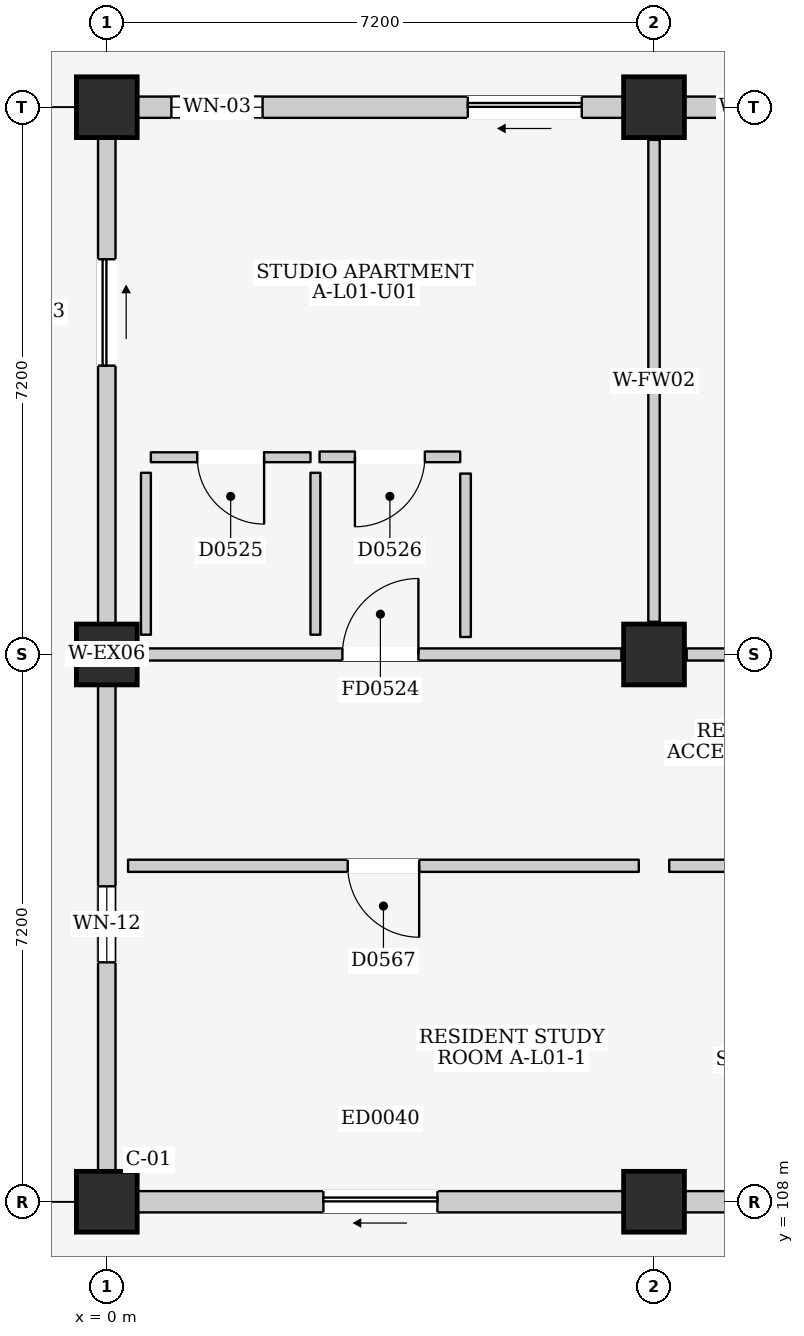
"""IFC4 building model, lengths in metres.
Left out: names, types, materials, properties, quantities, classifications, styles, units other than length and angle.
Written with IfcOpenShell. Run it as: python <this file> out.ifc"""

import sys

from ifc_helpers import new_model, si_unit, direction, frame, frame_2d, origin, origin_2d, place, context, subcontext, project, spatial, rectangle, extrude, element, fill, save


model = new_model("IFC4")
c1 = context("Model", 3, precision=1e-05, world=origin(), true_north=direction((0.0, 1.0)))
c2 = subcontext(c1, "Body", "Model", "MODEL_VIEW")
j1 = project(units=[si_unit("LENGTHUNIT", "METRE"), si_unit("PLANEANGLEUNIT", "RADIAN")], contexts=[c1])
p1 = place(None, origin())
s1 = spatial("IfcSite", under=j1, at=p1, CompositionType="ELEMENT")
p2 = place(p1, origin())
s2 = spatial("IfcBuilding", under=s1, at=p2, CompositionType="ELEMENT")
p3 = place(p2, frame((0.0, 0.0, 4.5)))
s3 = spatial("IfcBuildingStorey", under=s2, at=p3, CompositionType="ELEMENT", Elevation=4.5)
for number, where, z_axis, x_axis in (
    (1, (0.0, 108.0, 0.0), (0.0, 0.0, 1.0), (1.0, 0.0, 0.0)),
    (2, (0.0, 115.2, 0.0), (0.0, 0.0, 1.0), (1.0, 0.0, 0.0)),
    (3, (0.0, 122.4, 0.0), (0.0, 0.0, 1.0), (1.0, 0.0, 0.0)),
    (4, (7.2, 108.0, 0.0), (0.0, 0.0, 1.0), (1.0, 0.0, 0.0)),
    (5, (7.2, 115.2, 0.0), (0.0, 0.0, 1.0), (1.0, 0.0, 0.0)),
    (6, (7.2, 122.4, 0.0), (0.0, 0.0, 1.0), (1.0, 0.0, 0.0)),
):
    element("IfcColumn", number, at=place(p3, frame(where, z_axis=z_axis, x_axis=x_axis)), inside=s3, PredefinedType="COLUMN", context=c2, shape_type="SweptSolid", body=[
        extrude(rectangle(XDim=0.8, YDim=0.8, at=origin_2d()), origin(), (0.0, 0.0, 1.0), 4.5),
    ])
p4 = place(p3, frame((0.4, 122.4, 0.0), z_axis=(0.0, 0.0, 1.0), x_axis=(1.0, 0.0, 0.0)))
e7 = element("IfcWall", 7, at=p4, inside=s3, PredefinedType="ELEMENTEDWALL", context=c2, shape_type="SweptSolid", body=[
    extrude(rectangle(XDim=6.4, YDim=0.28, at=frame_2d((3.2, 0.0))), origin(), (0.0, 0.0, 1.0), 3.715),
])
p5 = place(p4, frame((4.35, 0.0, 0.0)))
e8 = element("IfcOpeningElement", 8, at=p5, cuts=e7, PredefinedType="OPENING", context=c2, shape_type="SweptSolid", body=[
    extrude(rectangle(XDim=1.5, YDim=2.12, at=frame_2d((0.75, 1.06))), frame((0.0, 0.155, 0.0), z_axis=(0.0, -1.0, 0.0), x_axis=(1.0, 0.0, 0.0)), (0.0, 0.0, 1.0), 0.31),
])
p6 = place(p4, frame((0.45, 0.0, 0.9)))
e9 = element("IfcOpeningElement", 9, at=p6, cuts=e7, PredefinedType="OPENING", context=c2, shape_type="SweptSolid", body=[
    extrude(rectangle(XDim=1.2, YDim=1.35, at=frame_2d((0.6, 0.675))), frame((0.0, 0.155, 0.0), z_axis=(0.0, -1.0, 0.0), x_axis=(1.0, 0.0, 0.0)), (0.0, 0.0, 1.0), 0.31),
])
p7 = place(p3, frame((0.4, 108.0, 0.0), z_axis=(0.0, 0.0, 1.0), x_axis=(1.0, 0.0, 0.0)))
e10 = element("IfcWall", 10, at=p7, inside=s3, PredefinedType="ELEMENTEDWALL", context=c2, shape_type="SweptSolid", body=[
    extrude(rectangle(XDim=6.4, YDim=0.28, at=frame_2d((3.2, 0.0))), origin(), (0.0, 0.0, 1.0), 3.585),
])
p8 = place(p7, frame((2.45, 0.0, 0.0)))
e11 = element("IfcOpeningElement", 11, at=p8, cuts=e10, PredefinedType="OPENING", context=c2, shape_type="SweptSolid", body=[
    extrude(rectangle(XDim=1.5, YDim=2.12, at=frame_2d((0.75, 1.06))), frame((0.0, 0.155, 0.0), z_axis=(0.0, -1.0, 0.0), x_axis=(1.0, 0.0, 0.0)), (0.0, 0.0, 1.0), 0.31),
])
p9 = place(p3, frame((7.6, 122.4, 0.0), z_axis=(0.0, 0.0, 1.0), x_axis=(1.0, 0.0, 0.0)))
e12 = element("IfcWall", 12, at=p9, inside=s3, PredefinedType="ELEMENTEDWALL", context=c2, shape_type="SweptSolid", body=[
    extrude(rectangle(XDim=6.4, YDim=0.28, at=frame_2d((3.2, 0.0))), origin(), (0.0, 0.0, 1.0), 3.715),
])
p10 = place(p9, frame((3.45, 0.0, 0.0)))
e13 = element("IfcOpeningElement", 13, at=p10, cuts=e12, PredefinedType="OPENING", context=c2, shape_type="SweptSolid", body=[
    extrude(rectangle(XDim=2.4, YDim=2.12, at=frame_2d((1.2, 1.06))), frame((0.0, 0.155, 0.0), z_axis=(0.0, -1.0, 0.0), x_axis=(1.0, 0.0, 0.0)), (0.0, 0.0, 1.0), 0.31),
])
p11 = place(p9, frame((0.45, 0.0, 0.9)))
e14 = element("IfcOpeningElement", 14, at=p11, cuts=e12, PredefinedType="OPENING", context=c2, shape_type="SweptSolid", body=[
    extrude(rectangle(XDim=0.9, YDim=1.1, at=frame_2d((0.45, 0.55))), frame((0.0, 0.155, 0.0), z_axis=(0.0, -1.0, 0.0), x_axis=(1.0, 0.0, 0.0)), (0.0, 0.0, 1.0), 0.31),
])
p12 = place(p3, frame((7.6, 108.0, 0.0), z_axis=(0.0, 0.0, 1.0), x_axis=(1.0, 0.0, 0.0)))
e15 = element("IfcWall", 15, at=p12, inside=s3, PredefinedType="ELEMENTEDWALL", context=c2, shape_type="SweptSolid", body=[
    extrude(rectangle(XDim=6.4, YDim=0.28, at=frame_2d((3.2, 0.0))), origin(), (0.0, 0.0, 1.0), 3.585),
])
p13 = place(p12, frame((2.45, 0.0, 0.0)))
e16 = element("IfcOpeningElement", 16, at=p13, cuts=e15, PredefinedType="OPENING", context=c2, shape_type="SweptSolid", body=[
    extrude(rectangle(XDim=1.5, YDim=2.12, at=frame_2d((0.75, 1.06))), frame((0.0, 0.155, 0.0), z_axis=(0.0, -1.0, 0.0), x_axis=(1.0, 0.0, 0.0)), (0.0, 0.0, 1.0), 0.31),
])
p14 = place(p3, frame((0.0, 108.4, 0.0), z_axis=(0.0, 0.0, 1.0), x_axis=(0.0, 1.0, 0.0)))
e17 = element("IfcWall", 17, at=p14, inside=s3, PredefinedType="ELEMENTEDWALL", context=c2, shape_type="SweptSolid", body=[
    extrude(rectangle(XDim=6.4, YDim=0.23, at=frame_2d((3.2, 0.0))), origin(), (0.0, 0.0, 1.0), 3.715),
])
p15 = place(p14, frame((2.75, 0.0, 1.1)))
e18 = element("IfcOpeningElement", 18, at=p15, cuts=e17, PredefinedType="OPENING", context=c2, shape_type="SweptSolid", body=[
    extrude(rectangle(XDim=1.0, YDim=0.9, at=frame_2d((0.5, 0.45))), frame((0.0, 0.13, 0.0), z_axis=(0.0, -1.0, 0.0), x_axis=(1.0, 0.0, 0.0)), (0.0, 0.0, 1.0), 0.26),
])
p16 = place(p3, frame((0.0, 115.6, 0.0), z_axis=(0.0, 0.0, 1.0), x_axis=(0.0, 1.0, 0.0)))
e19 = element("IfcWall", 19, at=p16, inside=s3, PredefinedType="ELEMENTEDWALL", context=c2, shape_type="SweptSolid", body=[
    extrude(rectangle(XDim=6.4, YDim=0.23, at=frame_2d((3.2, 0.0))), origin(), (0.0, 0.0, 1.0), 3.715),
])
p17 = place(p16, frame((3.4, 0.0, 0.0)))
e20 = element("IfcOpeningElement", 20, at=p17, cuts=e19, PredefinedType="OPENING", context=c2, shape_type="SweptSolid", body=[
    extrude(rectangle(XDim=1.4, YDim=2.1, at=frame_2d((0.7, 1.05))), frame((0.0, 0.13, 0.0), z_axis=(0.0, -1.0, 0.0), x_axis=(1.0, 0.0, 0.0)), (0.0, 0.0, 1.0), 0.26),
])
p18 = place(p3, frame((0.43, 115.2, 0.0), z_axis=(0.0, 0.0, 1.0), x_axis=(1.0, 0.0, 0.0)))
e21 = element("IfcWall", 21, at=p18, inside=s3, PredefinedType="PARTITIONING", context=c2, shape_type="SweptSolid", body=[
    extrude(rectangle(XDim=6.34, YDim=0.16, at=frame_2d((3.17, 0.0))), origin(), (0.0, 0.0, 1.0), 3.585),
])
p19 = place(p18, frame((2.67, 0.0, 0.0)))
e22 = element("IfcOpeningElement", 22, at=p19, cuts=e21, PredefinedType="OPENING", context=c2, shape_type="SweptSolid", body=[
    extrude(rectangle(XDim=1.0, YDim=2.15, at=frame_2d((0.5, 1.075))), frame((0.0, 0.095, 0.0), z_axis=(0.0, -1.0, 0.0), x_axis=(1.0, 0.0, 0.0)), (0.0, 0.0, 1.0), 0.19),
])
p20 = place(p3, frame((7.2, 115.63, 0.0), z_axis=(0.0, 0.0, 1.0), x_axis=(0.0, 1.0, 0.0)))
e23 = element("IfcWall", 23, at=p20, inside=s3, PredefinedType="PARTITIONING", context=c2, shape_type="SweptSolid", body=[
    extrude(rectangle(XDim=6.34, YDim=0.15, at=frame_2d((3.17, 0.0))), origin(), (0.0, 0.0, 1.0), 3.685),
])
p21 = place(p3, frame((0.58, 117.795, 0.0), z_axis=(0.0, 0.0, 1.0), x_axis=(1.0, 0.0, 0.0)))
e24 = element("IfcWall", 24, at=p21, inside=s3, PredefinedType="PARTITIONING", context=c2, shape_type="SweptSolid", body=[
    extrude(rectangle(XDim=2.1, YDim=0.13, at=frame_2d((1.05, 0.0))), origin(), (0.0, 0.0, 1.0), 4.25),
])
p22 = place(p21, frame((0.61, 0.0, 0.0)))
e25 = element("IfcOpeningElement", 25, at=p22, cuts=e24, PredefinedType="OPENING", context=c2, shape_type="SweptSolid", body=[
    extrude(rectangle(XDim=0.88, YDim=2.1, at=frame_2d((0.44, 1.05))), frame((0.0, 0.08, 0.0), z_axis=(0.0, -1.0, 0.0), x_axis=(1.0, 0.0, 0.0)), (0.0, 0.0, 1.0), 0.16),
])
for number, where, z_axis, x_axis in (
    (26, (2.745, 115.46, 0.0), (0.0, 0.0, 1.0), (0.0, 1.0, 0.0)),
    (27, (0.515, 115.46, 0.0), (0.0, 0.0, 1.0), (0.0, 1.0, 0.0)),
):
    element("IfcWall", number, at=place(p3, frame(where, z_axis=z_axis, x_axis=x_axis)), inside=s3, PredefinedType="PARTITIONING", context=c2, shape_type="SweptSolid", body=[
        extrude(rectangle(XDim=2.13, YDim=0.13, at=frame_2d((1.065, 0.0))), origin(), (0.0, 0.0, 1.0), 4.25),
    ])
p23 = place(p3, frame((2.8, 117.8, 0.0), z_axis=(0.0, 0.0, 1.0), x_axis=(1.0, 0.0, 0.0)))
e28 = element("IfcWall", 28, at=p23, inside=s3, PredefinedType="PARTITIONING", context=c2, shape_type="SweptSolid", body=[
    extrude(rectangle(XDim=1.85, YDim=0.14, at=frame_2d((0.925, 0.0))), origin(), (0.0, 0.0, 1.0), 4.25),
])
p24 = place(p23, frame((0.465, 0.0, 0.0)))
e29 = element("IfcOpeningElement", 29, at=p24, cuts=e28, PredefinedType="OPENING", context=c2, shape_type="SweptSolid", body=[
    extrude(rectangle(XDim=0.92, YDim=2.1, at=frame_2d((0.46, 1.05))), frame((0.0, 0.085, 0.0), z_axis=(0.0, -1.0, 0.0), x_axis=(1.0, 0.0, 0.0)), (0.0, 0.0, 1.0), 0.17),
])
p25 = place(p3, frame((4.72, 115.43, 0.0), z_axis=(0.0, 0.0, 1.0), x_axis=(0.0, 1.0, 0.0)))
e30 = element("IfcWall", 30, at=p25, inside=s3, PredefinedType="PARTITIONING", context=c2, shape_type="SweptSolid", body=[
    extrude(rectangle(XDim=2.15, YDim=0.14, at=frame_2d((1.075, 0.0))), origin(), (0.0, 0.0, 1.0), 4.25),
])
p26 = place(p3, frame((7.63, 115.2, 0.0), z_axis=(0.0, 0.0, 1.0), x_axis=(1.0, 0.0, 0.0)))
e31 = element("IfcWall", 31, at=p26, inside=s3, PredefinedType="PARTITIONING", context=c2, shape_type="SweptSolid", body=[
    extrude(rectangle(XDim=6.34, YDim=0.16, at=frame_2d((3.17, 0.0))), origin(), (0.0, 0.0, 1.0), 3.585),
])
p27 = place(p26, frame((2.645, 0.0, 0.0)))
e32 = element("IfcOpeningElement", 32, at=p27, cuts=e31, PredefinedType="OPENING", context=c2, shape_type="SweptSolid", body=[
    extrude(rectangle(XDim=1.05, YDim=2.2, at=frame_2d((0.525, 1.1))), frame((0.0, 0.095, 0.0), z_axis=(0.0, -1.0, 0.0), x_axis=(1.0, 0.0, 0.0)), (0.0, 0.0, 1.0), 0.19),
])
p28 = place(p3, frame((0.28, 112.42, 0.0), z_axis=(0.0, 0.0, 1.0), x_axis=(1.0, 0.0, 0.0)))
e33 = element("IfcWall", 33, at=p28, inside=s3, PredefinedType="PARTITIONING", context=c2, shape_type="SweptSolid", body=[
    extrude(rectangle(XDim=6.72, YDim=0.16, at=frame_2d((3.36, 0.0))), origin(), (0.0, 0.0, 1.0), 4.25),
])
p29 = place(p28, frame((2.89, 0.0, 0.0)))
e34 = element("IfcOpeningElement", 34, at=p29, cuts=e33, PredefinedType="OPENING", context=c2, shape_type="SweptSolid", body=[
    extrude(rectangle(XDim=0.94, YDim=2.12, at=frame_2d((0.47, 1.06))), frame((0.0, 0.095, 0.0), z_axis=(0.0, -1.0, 0.0), x_axis=(1.0, 0.0, 0.0)), (0.0, 0.0, 1.0), 0.19),
])
p30 = place(p3, frame((7.4, 112.42, 0.0), z_axis=(0.0, 0.0, 1.0), x_axis=(1.0, 0.0, 0.0)))
e35 = element("IfcWall", 35, at=p30, inside=s3, PredefinedType="PARTITIONING", context=c2, shape_type="SweptSolid", body=[
    extrude(rectangle(XDim=6.8, YDim=0.16, at=frame_2d((3.4, 0.0))), origin(), (0.0, 0.0, 1.0), 4.25),
])
p31 = place(p30, frame((2.93, 0.0, 0.0)))
e36 = element("IfcOpeningElement", 36, at=p31, cuts=e35, PredefinedType="OPENING", context=c2, shape_type="SweptSolid", body=[
    extrude(rectangle(XDim=0.94, YDim=2.12, at=frame_2d((0.47, 1.06))), frame((0.0, 0.095, 0.0), z_axis=(0.0, -1.0, 0.0), x_axis=(1.0, 0.0, 0.0)), (0.0, 0.0, 1.0), 0.19),
])
p32 = place(p5, frame((1.5, 0.0, 0.0), z_axis=(0.0, 0.0, 1.0), x_axis=(-1.0, 0.0, 0.0)))
e37 = element("IfcDoor", 37, at=p32, inside=s3, OperationType="SLIDING_TO_LEFT", PredefinedType="DOOR", context=c2, shape_type="SweptSolid", body=[
    extrude(rectangle(XDim=1.5, YDim=2.12, at=frame_2d((0.75, 1.06))), frame((0.0, 0.025, 0.0), z_axis=(0.0, -1.0, 0.0), x_axis=(1.0, 0.0, 0.0)), (0.0, 0.0, 1.0), 0.05),
])
fill(e8, e37)
p33 = place(p6, origin())
e38 = element("IfcWindow", 38, at=p33, inside=s3, PartitioningType="SINGLE_PANEL", PredefinedType="WINDOW", context=c2, shape_type="SweptSolid", body=[
    extrude(rectangle(XDim=1.2, YDim=1.35, at=frame_2d((0.6, 0.675))), frame((0.0, 0.03, 0.0), z_axis=(0.0, -1.0, 0.0), x_axis=(1.0, 0.0, 0.0)), (0.0, 0.0, 1.0), 0.06),
])
fill(e9, e38)
p34 = place(p8, frame((1.5, 0.0, 0.0), z_axis=(0.0, 0.0, 1.0), x_axis=(-1.0, 0.0, 0.0)))
e39 = element("IfcDoor", 39, at=p34, inside=s3, OperationType="SLIDING_TO_LEFT", PredefinedType="DOOR", context=c2, shape_type="SweptSolid", body=[
    extrude(rectangle(XDim=1.5, YDim=2.12, at=frame_2d((0.75, 1.06))), frame((0.0, 0.025, 0.0), z_axis=(0.0, -1.0, 0.0), x_axis=(1.0, 0.0, 0.0)), (0.0, 0.0, 1.0), 0.05),
])
fill(e11, e39)
p35 = place(p11, origin())
e40 = element("IfcWindow", 40, at=p35, inside=s3, PartitioningType="SINGLE_PANEL", PredefinedType="WINDOW", context=c2, shape_type="SweptSolid", body=[
    extrude(rectangle(XDim=0.9, YDim=1.1, at=frame_2d((0.45, 0.55))), frame((0.0, 0.03, 0.0), z_axis=(0.0, -1.0, 0.0), x_axis=(1.0, 0.0, 0.0)), (0.0, 0.0, 1.0), 0.06),
])
fill(e14, e40)
p36 = place(p15, origin())
e41 = element("IfcWindow", 41, at=p36, inside=s3, PartitioningType="SINGLE_PANEL", PredefinedType="WINDOW", context=c2, shape_type="SweptSolid", body=[
    extrude(rectangle(XDim=1.0, YDim=0.9, at=frame_2d((0.5, 0.45))), frame((0.0, 0.03, 0.0), z_axis=(0.0, -1.0, 0.0), x_axis=(1.0, 0.0, 0.0)), (0.0, 0.0, 1.0), 0.06),
])
fill(e18, e41)
p37 = place(p17, frame((1.4, 0.0, 0.0), z_axis=(0.0, 0.0, 1.0), x_axis=(-1.0, 0.0, 0.0)))
e42 = element("IfcDoor", 42, at=p37, inside=s3, OperationType="SLIDING_TO_RIGHT", PredefinedType="DOOR", context=c2, shape_type="SweptSolid", body=[
    extrude(rectangle(XDim=1.4, YDim=2.1, at=frame_2d((0.7, 1.05))), frame((0.0, 0.025, 0.0), z_axis=(0.0, -1.0, 0.0), x_axis=(1.0, 0.0, 0.0)), (0.0, 0.0, 1.0), 0.05),
])
fill(e20, e42)
p38 = place(p19, origin())
e43 = element("IfcDoor", 43, at=p38, inside=s3, OperationType="SINGLE_SWING_RIGHT", PredefinedType="DOOR", context=c2, shape_type="SweptSolid", body=[
    extrude(rectangle(XDim=1.0, YDim=2.15, at=frame_2d((0.5, 1.075))), frame((0.0, 0.025, 0.0), z_axis=(0.0, -1.0, 0.0), x_axis=(1.0, 0.0, 0.0)), (0.0, 0.0, 1.0), 0.05),
])
fill(e22, e43)
p39 = place(p22, frame((0.88, 0.0, 0.0), z_axis=(0.0, 0.0, 1.0), x_axis=(-1.0, 0.0, 0.0)))
e44 = element("IfcDoor", 44, at=p39, inside=s3, OperationType="SINGLE_SWING_LEFT", PredefinedType="DOOR", context=c2, shape_type="SweptSolid", body=[
    extrude(rectangle(XDim=0.88, YDim=2.1, at=frame_2d((0.44, 1.05))), frame((0.0, 0.025, 0.0), z_axis=(0.0, -1.0, 0.0), x_axis=(1.0, 0.0, 0.0)), (0.0, 0.0, 1.0), 0.05),
])
fill(e25, e44)
p40 = place(p24, frame((0.92, 0.0, 0.0), z_axis=(0.0, 0.0, 1.0), x_axis=(-1.0, 0.0, 0.0)))
e45 = element("IfcDoor", 45, at=p40, inside=s3, OperationType="SINGLE_SWING_RIGHT", PredefinedType="DOOR", context=c2, shape_type="SweptSolid", body=[
    extrude(rectangle(XDim=0.92, YDim=2.1, at=frame_2d((0.46, 1.05))), frame((0.0, 0.025, 0.0), z_axis=(0.0, -1.0, 0.0), x_axis=(1.0, 0.0, 0.0)), (0.0, 0.0, 1.0), 0.05),
])
fill(e29, e45)
p41 = place(p29, frame((0.94, 0.0, 0.0), z_axis=(0.0, 0.0, 1.0), x_axis=(-1.0, 0.0, 0.0)))
e46 = element("IfcDoor", 46, at=p41, inside=s3, OperationType="SINGLE_SWING_LEFT", PredefinedType="DOOR", context=c2, shape_type="SweptSolid", body=[
    extrude(rectangle(XDim=0.94, YDim=2.12, at=frame_2d((0.47, 1.06))), frame((0.0, 0.025, 0.0), z_axis=(0.0, -1.0, 0.0), x_axis=(1.0, 0.0, 0.0)), (0.0, 0.0, 1.0), 0.05),
])
fill(e34, e46)
save(model, sys.argv[1])
